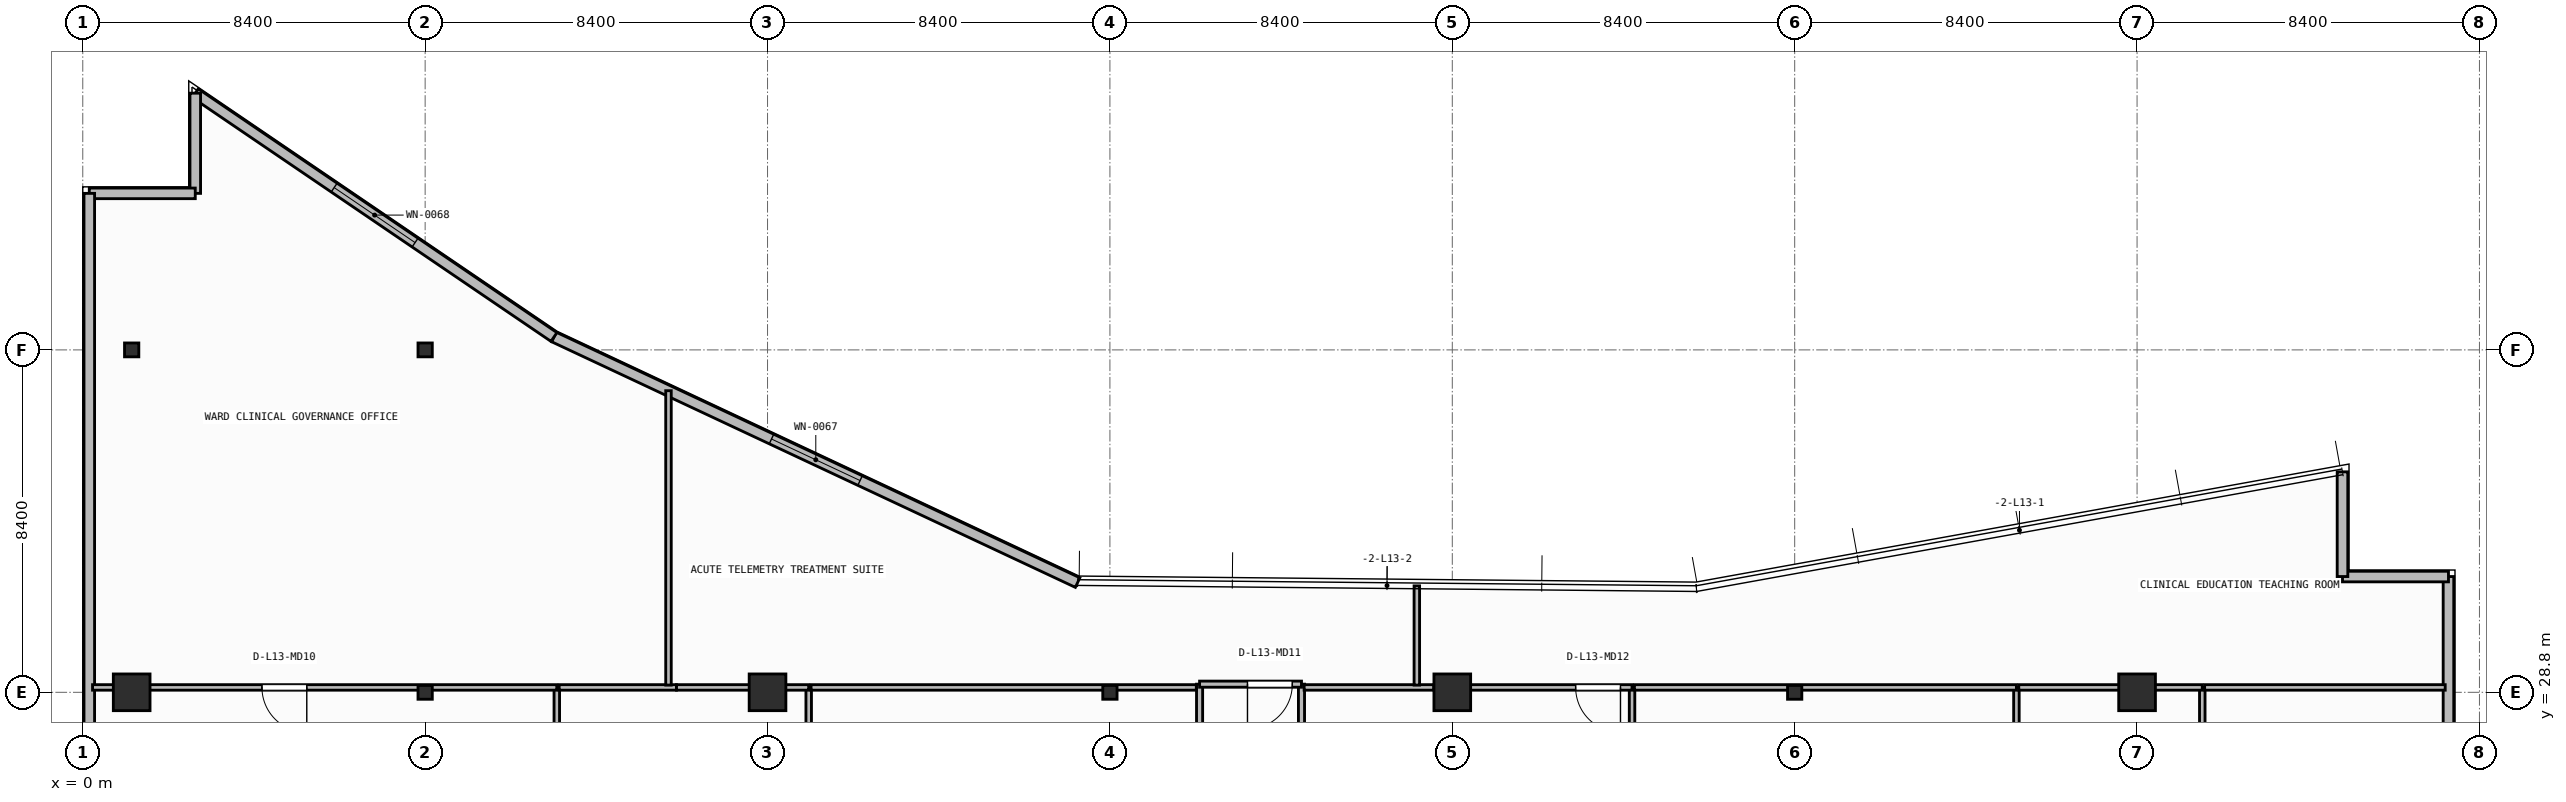
"""IFC4 building model, lengths in metres.
Left out: names, types, materials, properties, quantities, classifications, styles, units other than length and angle.
Written with IfcOpenShell. Run it as: python <this file> out.ifc"""

import sys

from ifc_helpers import new_model, si_unit, direction, frame, frame_2d, origin, origin_2d, place, context, subcontext, project, spatial, rectangle, i_section, extrude, element, fill, save


model = new_model("IFC4")
c1 = context("Model", 3, precision=1e-05, world=origin(), true_north=direction((0.0, 1.0)))
c2 = subcontext(c1, "Body", "Model", "MODEL_VIEW")
j1 = project(units=[si_unit("LENGTHUNIT", "METRE"), si_unit("PLANEANGLEUNIT", "RADIAN")], contexts=[c1])
p1 = place(None, origin())
s1 = spatial("IfcSite", under=j1, at=p1, CompositionType="ELEMENT")
p2 = place(p1, origin())
s2 = spatial("IfcBuilding", under=s1, at=p2, CompositionType="ELEMENT")
p3 = place(p2, frame((0.0, 0.0, 54.1)))
s3 = spatial("IfcBuildingStorey", under=s2, at=p3, CompositionType="ELEMENT", Elevation=54.1)
p4 = place(p3, frame((1.2, 28.8, 0.0), z_axis=(0.0, 0.0, 1.0), x_axis=(1.0, 0.0, 0.0)))
e1 = element("IfcColumn", 1, at=p4, inside=s3, PredefinedType="COLUMN", context=c2, shape_type="SweptSolid", body=[
    extrude(rectangle(XDim=0.9, YDim=0.9, at=origin_2d()), origin(), (0.0, 0.0, 1.0), 3.95),
])
p5 = place(p3, frame((8.4, 28.8, 0.0), z_axis=(0.0, 0.0, 1.0), x_axis=(1.0, 0.0, 0.0)))
e2 = element("IfcColumn", 2, at=p5, inside=s3, PredefinedType="COLUMN", context=c2, shape_type="SweptSolid", body=[
    extrude(i_section(OverallWidth=0.35, OverallDepth=0.34, WebThickness=0.016, FlangeThickness=0.028, at=origin_2d()), origin(), (0.0, 0.0, 1.0), 3.95),
])
p6 = place(p3, frame((16.8, 28.8, 0.0), z_axis=(0.0, 0.0, 1.0), x_axis=(1.0, 0.0, 0.0)))
e3 = element("IfcColumn", 3, at=p6, inside=s3, PredefinedType="COLUMN", context=c2, shape_type="SweptSolid", body=[
    extrude(rectangle(XDim=0.9, YDim=0.9, at=origin_2d()), origin(), (0.0, 0.0, 1.0), 3.95),
])
p7 = place(p3, frame((25.2, 28.8, 0.0), z_axis=(0.0, 0.0, 1.0), x_axis=(1.0, 0.0, 0.0)))
e4 = element("IfcColumn", 4, at=p7, inside=s3, PredefinedType="COLUMN", context=c2, shape_type="SweptSolid", body=[
    extrude(i_section(OverallWidth=0.35, OverallDepth=0.34, WebThickness=0.016, FlangeThickness=0.028, at=origin_2d()), origin(), (0.0, 0.0, 1.0), 3.95),
])
p8 = place(p3, frame((33.6, 28.8, 0.0), z_axis=(0.0, 0.0, 1.0), x_axis=(1.0, 0.0, 0.0)))
e5 = element("IfcColumn", 5, at=p8, inside=s3, PredefinedType="COLUMN", context=c2, shape_type="SweptSolid", body=[
    extrude(rectangle(XDim=0.9, YDim=0.9, at=origin_2d()), origin(), (0.0, 0.0, 1.0), 3.95),
])
p9 = place(p3, frame((42.0, 28.8, 0.0), z_axis=(0.0, 0.0, 1.0), x_axis=(1.0, 0.0, 0.0)))
e6 = element("IfcColumn", 6, at=p9, inside=s3, PredefinedType="COLUMN", context=c2, shape_type="SweptSolid", body=[
    extrude(i_section(OverallWidth=0.35, OverallDepth=0.34, WebThickness=0.016, FlangeThickness=0.028, at=origin_2d()), origin(), (0.0, 0.0, 1.0), 3.95),
])
p10 = place(p3, frame((50.4, 28.8, 0.0), z_axis=(0.0, 0.0, 1.0), x_axis=(1.0, 0.0, 0.0)))
e7 = element("IfcColumn", 7, at=p10, inside=s3, PredefinedType="COLUMN", context=c2, shape_type="SweptSolid", body=[
    extrude(rectangle(XDim=0.9, YDim=0.9, at=origin_2d()), origin(), (0.0, 0.0, 1.0), 3.95),
])
for number, where, z_axis, x_axis in (
    (8, (1.2, 37.2, 0.0), (0.0, 0.0, 1.0), (1.0, 0.0, 0.0)),
    (9, (8.4, 37.2, 0.0), (0.0, 0.0, 1.0), (1.0, 0.0, 0.0)),
):
    element("IfcColumn", number, at=place(p3, frame(where, z_axis=z_axis, x_axis=x_axis)), inside=s3, PredefinedType="COLUMN", context=c2, shape_type="SweptSolid", body=[
        extrude(i_section(OverallWidth=0.35, OverallDepth=0.34, WebThickness=0.016, FlangeThickness=0.028, at=origin_2d()), origin(), (0.0, 0.0, 1.0), 3.95),
    ])
p11 = place(p3, frame((58.04, 7.16, 0.0), z_axis=(0.0, 0.0, 1.0), x_axis=(0.0, 1.0, 0.0)))
e10 = element("IfcWall", 10, at=p11, inside=s3, PredefinedType="STANDARD", context=c2, shape_type="SweptSolid", body=[
    extrude(rectangle(XDim=24.48, YDim=0.26, at=frame_2d((12.24, 0.0))), origin(), (0.0, 0.0, 1.0), 3.71),
])
p12 = place(p11, frame((13.44, 0.0, 0.0)))
e11 = element("IfcOpeningElement", 11, at=p12, cuts=e10, PredefinedType="OPENING", context=c2, shape_type="SweptSolid", body=[
    extrude(rectangle(XDim=1.3, YDim=2.15, at=frame_2d((0.65, 1.075))), frame((0.0, 0.14, 0.0), z_axis=(0.0, -1.0, 0.0), x_axis=(1.0, 0.0, 0.0)), (0.0, 0.0, 1.0), 0.28),
])
p13 = place(p11, frame((8.65, 0.0, 0.9)))
e12 = element("IfcOpeningElement", 12, at=p13, cuts=e10, PredefinedType="OPENING", context=c2, shape_type="SweptSolid", body=[
    extrude(rectangle(XDim=2.4, YDim=1.65, at=frame_2d((1.2, 0.825))), frame((0.0, 0.14, 0.0), z_axis=(0.0, -1.0, 0.0), x_axis=(1.0, 0.0, 0.0)), (0.0, 0.0, 1.0), 0.28),
])
p14 = place(p3, frame((58.04, 31.64, 0.0), z_axis=(0.0, 0.0, 1.0), x_axis=(-1.0, 0.0, 0.0)))
e13 = element("IfcWall", 13, at=p14, inside=s3, PredefinedType="STANDARD", context=c2, shape_type="SweptSolid", body=[
    extrude(rectangle(XDim=2.6, YDim=0.26, at=frame_2d((1.3, 0.0))), origin(), (0.0, 0.0, 1.0), 3.71),
])
p15 = place(p3, frame((55.44, 31.64, 0.0), z_axis=(0.0, 0.0, 1.0), x_axis=(0.0, 1.0, 0.0)))
e14 = element("IfcWall", 14, at=p15, inside=s3, PredefinedType="STANDARD", context=c2, shape_type="SweptSolid", body=[
    extrude(rectangle(XDim=2.569, YDim=0.26, at=frame_2d((1.284, 0.0))), origin(), (0.0, 0.0, 1.0), 3.71),
])
p16 = place(p3, frame((24.408, 31.492, 0.0), z_axis=(0.0, 0.0, 1.0), x_axis=(-0.905396522918, 0.424566998585, 0.0)))
e15 = element("IfcWall", 15, at=p16, inside=s3, PredefinedType="STANDARD", context=c2, shape_type="SweptSolid", body=[
    extrude(rectangle(XDim=14.189, YDim=0.26, at=frame_2d((7.095, 0.0))), origin(), (0.0, 0.0, 1.0), 3.71),
])
p17 = place(p16, frame((5.895, 0.0, 0.9)))
e16 = element("IfcOpeningElement", 16, at=p17, cuts=e15, PredefinedType="OPENING", context=c2, shape_type="SweptSolid", body=[
    extrude(rectangle(XDim=2.4, YDim=1.65, at=frame_2d((1.2, 0.825))), frame((0.0, 0.14, 0.0), z_axis=(0.0, -1.0, 0.0), x_axis=(1.0, 0.0, 0.0)), (0.0, 0.0, 1.0), 0.28),
])
p18 = place(p3, frame((11.561, 37.517, 0.0), z_axis=(0.0, 0.0, 1.0), x_axis=(-0.827064743936, 0.562106670782, 0.0)))
e17 = element("IfcWall", 17, at=p18, inside=s3, PredefinedType="STANDARD", context=c2, shape_type="SweptSolid", body=[
    extrude(rectangle(XDim=10.641, YDim=0.26, at=frame_2d((5.32, 0.0))), origin(), (0.0, 0.0, 1.0), 3.71),
])
p19 = place(p18, frame((4.12, 0.0, 0.9)))
e18 = element("IfcOpeningElement", 18, at=p19, cuts=e17, PredefinedType="OPENING", context=c2, shape_type="SweptSolid", body=[
    extrude(rectangle(XDim=2.4, YDim=1.65, at=frame_2d((1.2, 0.825))), frame((0.0, 0.14, 0.0), z_axis=(0.0, -1.0, 0.0), x_axis=(1.0, 0.0, 0.0)), (0.0, 0.0, 1.0), 0.28),
])
p20 = place(p3, frame((2.76, 43.498, 0.0), z_axis=(0.0, 0.0, 1.0), x_axis=(0.0, -1.0, 0.0)))
e19 = element("IfcWall", 19, at=p20, inside=s3, PredefinedType="STANDARD", context=c2, shape_type="SweptSolid", body=[
    extrude(rectangle(XDim=2.458, YDim=0.26, at=frame_2d((1.229, 0.0))), origin(), (0.0, 0.0, 1.0), 3.71),
])
p21 = place(p3, frame((2.76, 41.04, 0.0), z_axis=(0.0, 0.0, 1.0), x_axis=(-1.0, 0.0, 0.0)))
e20 = element("IfcWall", 20, at=p21, inside=s3, PredefinedType="STANDARD", context=c2, shape_type="SweptSolid", body=[
    extrude(rectangle(XDim=2.6, YDim=0.26, at=frame_2d((1.3, 0.0))), origin(), (0.0, 0.0, 1.0), 3.71),
])
p22 = place(p3, frame((0.16, 41.04, 0.0), z_axis=(0.0, 0.0, 1.0), x_axis=(0.0, -1.0, 0.0)))
e21 = element("IfcWall", 21, at=p22, inside=s3, PredefinedType="STANDARD", context=c2, shape_type="SweptSolid", body=[
    extrude(rectangle(XDim=38.28, YDim=0.26, at=frame_2d((19.14, 0.0))), origin(), (0.0, 0.0, 1.0), 3.71),
])
p23 = place(p22, frame((17.94, 0.0, 0.9)))
e22 = element("IfcOpeningElement", 22, at=p23, cuts=e21, PredefinedType="OPENING", context=c2, shape_type="SweptSolid", body=[
    extrude(rectangle(XDim=2.4, YDim=1.65, at=frame_2d((1.2, 0.825))), frame((0.0, 0.14, 0.0), z_axis=(0.0, -1.0, 0.0), x_axis=(1.0, 0.0, 0.0)), (0.0, 0.0, 1.0), 0.28),
])
p24 = place(p22, frame((22.869, 0.0, 0.9)))
e23 = element("IfcOpeningElement", 23, at=p24, cuts=e21, PredefinedType="OPENING", context=c2, shape_type="SweptSolid", body=[
    extrude(rectangle(XDim=2.4, YDim=1.65, at=frame_2d((1.2, 0.825))), frame((0.0, 0.14, 0.0), z_axis=(0.0, -1.0, 0.0), x_axis=(1.0, 0.0, 0.0)), (0.0, 0.0, 1.0), 0.28),
])
p25 = place(p3, frame((27.4, 29.0, 0.0), z_axis=(0.0, 0.0, 1.0), x_axis=(0.0, -1.0, 0.0)))
e24 = element("IfcWall", 24, at=p25, inside=s3, PredefinedType="PARTITIONING", context=c2, shape_type="SweptSolid", body=[
    extrude(rectangle(XDim=9.432, YDim=0.15, at=frame_2d((4.716, 0.0))), origin(), (0.0, 0.0, 1.0), 3.71),
])
p26 = place(p25, frame((3.769, 0.0, 0.0)))
e25 = element("IfcOpeningElement", 25, at=p26, cuts=e24, PredefinedType="OPENING", context=c2, shape_type="SweptSolid", body=[
    extrude(rectangle(XDim=1.1, YDim=2.1, at=frame_2d((0.55, 1.05))), frame((0.0, 0.085, 0.0), z_axis=(0.0, -1.0, 0.0), x_axis=(1.0, 0.0, 0.0)), (0.0, 0.0, 1.0), 0.17),
])
p27 = place(p3, frame((29.9, 19.568, 0.0), z_axis=(0.0, 0.0, 1.0), x_axis=(0.0, 1.0, 0.0)))
e26 = element("IfcWall", 26, at=p27, inside=s3, PredefinedType="PARTITIONING", context=c2, shape_type="SweptSolid", body=[
    extrude(rectangle(XDim=9.432, YDim=0.15, at=frame_2d((4.716, 0.0))), origin(), (0.0, 0.0, 1.0), 3.71),
])
p28 = place(p27, frame((4.166, 0.0, 0.0)))
e27 = element("IfcOpeningElement", 27, at=p28, cuts=e26, PredefinedType="OPENING", context=c2, shape_type="SweptSolid", body=[
    extrude(rectangle(XDim=1.1, YDim=2.1, at=frame_2d((0.55, 1.05))), frame((0.0, 0.085, 0.0), z_axis=(0.0, -1.0, 0.0), x_axis=(1.0, 0.0, 0.0)), (0.0, 0.0, 1.0), 0.17),
])
p29 = place(p3, frame((29.9, 29.0, 0.0), z_axis=(0.0, 0.0, 1.0), x_axis=(-1.0, 0.0, 0.0)))
e28 = element("IfcWall", 28, at=p29, inside=s3, PredefinedType="PARTITIONING", context=c2, shape_type="SweptSolid", body=[
    extrude(rectangle(XDim=2.5, YDim=0.15, at=frame_2d((1.25, 0.0))), origin(), (0.0, 0.0, 1.0), 3.326),
])
p30 = place(p29, frame((0.225, 0.0, 0.0)))
e29 = element("IfcOpeningElement", 29, at=p30, cuts=e28, PredefinedType="OPENING", context=c2, shape_type="SweptSolid", body=[
    extrude(rectangle(XDim=1.1, YDim=2.1, at=frame_2d((0.55, 1.05))), frame((0.0, 0.085, 0.0), z_axis=(0.0, -1.0, 0.0), x_axis=(1.0, 0.0, 0.0)), (0.0, 0.0, 1.0), 0.17),
])
p31 = place(p3, frame((11.63, 19.397, 0.0), z_axis=(0.0, 0.0, 1.0), x_axis=(0.0, 1.0, 0.0)))
e30 = element("IfcWall", 30, at=p31, inside=s3, PredefinedType="PARTITIONING", context=c2, shape_type="SweptSolid", body=[
    extrude(rectangle(XDim=9.522, YDim=0.135, at=frame_2d((4.761, 0.0))), origin(), (0.0, 0.0, 1.0), 3.71),
])
p32 = place(p3, frame((11.63, 28.92, 0.0), z_axis=(0.0, 0.0, 1.0), x_axis=(-1.0, 0.0, 0.0)))
e31 = element("IfcWall", 31, at=p32, inside=s3, PredefinedType="PARTITIONING", context=c2, shape_type="SweptSolid", body=[
    extrude(rectangle(XDim=11.39, YDim=0.135, at=frame_2d((5.695, 0.0))), origin(), (0.0, 0.0, 1.0), 3.073),
])
p33 = place(p32, frame((6.134, 0.0, 0.0)))
e32 = element("IfcOpeningElement", 32, at=p33, cuts=e31, PredefinedType="OPENING", context=c2, shape_type="SweptSolid", body=[
    extrude(rectangle(XDim=1.1, YDim=2.1, at=frame_2d((0.55, 1.05))), frame((0.0, 0.077, 0.0), z_axis=(0.0, -1.0, 0.0), x_axis=(1.0, 0.0, 0.0)), (0.0, 0.0, 1.0), 0.155),
])
p34 = place(p3, frame((17.81, 19.397, 0.0), z_axis=(0.0, 0.0, 1.0), x_axis=(0.0, 1.0, 0.0)))
e33 = element("IfcWall", 33, at=p34, inside=s3, PredefinedType="PARTITIONING", context=c2, shape_type="SweptSolid", body=[
    extrude(rectangle(XDim=9.522, YDim=0.135, at=frame_2d((4.761, 0.0))), origin(), (0.0, 0.0, 1.0), 3.71),
])
p35 = place(p3, frame((14.565, 28.92, 0.0), z_axis=(0.0, 0.0, 1.0), x_axis=(-1.0, 0.0, 0.0)))
e34 = element("IfcWall", 34, at=p35, inside=s3, PredefinedType="PARTITIONING", context=c2, shape_type="SweptSolid", body=[
    extrude(rectangle(XDim=2.877, YDim=0.135, at=frame_2d((1.438, 0.0))), origin(), (0.0, 0.0, 1.0), 3.073),
])
p36 = place(p3, frame((17.81, 28.92, 0.0), z_axis=(0.0, 0.0, 1.0), x_axis=(-1.0, 0.0, 0.0)))
e35 = element("IfcWall", 35, at=p36, inside=s3, PredefinedType="PARTITIONING", context=c2, shape_type="SweptSolid", body=[
    extrude(rectangle(XDim=3.243, YDim=0.135, at=frame_2d((1.622, 0.0))), origin(), (0.0, 0.0, 1.0), 3.073),
])
p37 = place(p3, frame((27.32, 28.92, 0.0), z_axis=(0.0, 0.0, 1.0), x_axis=(-1.0, 0.0, 0.0)))
e36 = element("IfcWall", 36, at=p37, inside=s3, PredefinedType="PARTITIONING", context=c2, shape_type="SweptSolid", body=[
    extrude(rectangle(XDim=9.453, YDim=0.135, at=frame_2d((4.726, 0.0))), origin(), (0.0, 0.0, 1.0), 3.073),
])
p38 = place(p3, frame((38.01, 19.397, 0.0), z_axis=(0.0, 0.0, 1.0), x_axis=(0.0, 1.0, 0.0)))
e37 = element("IfcWall", 37, at=p38, inside=s3, PredefinedType="PARTITIONING", context=c2, shape_type="SweptSolid", body=[
    extrude(rectangle(XDim=9.522, YDim=0.135, at=frame_2d((4.761, 0.0))), origin(), (0.0, 0.0, 1.0), 3.71),
])
p39 = place(p38, frame((4.211, 0.0, 0.0)))
e38 = element("IfcOpeningElement", 38, at=p39, cuts=e37, PredefinedType="OPENING", context=c2, shape_type="SweptSolid", body=[
    extrude(rectangle(XDim=1.1, YDim=2.1, at=frame_2d((0.55, 1.05))), frame((0.0, 0.077, 0.0), z_axis=(0.0, -1.0, 0.0), x_axis=(1.0, 0.0, 0.0)), (0.0, 0.0, 1.0), 0.155),
])
p40 = place(p3, frame((33.15, 28.92, 0.0), z_axis=(0.0, 0.0, 1.0), x_axis=(-1.0, 0.0, 0.0)))
e39 = element("IfcWall", 39, at=p40, inside=s3, PredefinedType="PARTITIONING", context=c2, shape_type="SweptSolid", body=[
    extrude(rectangle(XDim=3.185, YDim=0.135, at=frame_2d((1.592, 0.0))), origin(), (0.0, 0.0, 1.0), 3.326),
])
p41 = place(p3, frame((38.01, 28.92, 0.0), z_axis=(0.0, 0.0, 1.0), x_axis=(-1.0, 0.0, 0.0)))
e40 = element("IfcWall", 40, at=p41, inside=s3, PredefinedType="PARTITIONING", context=c2, shape_type="SweptSolid", body=[
    extrude(rectangle(XDim=4.858, YDim=0.135, at=frame_2d((2.429, 0.0))), origin(), (0.0, 0.0, 1.0), 3.326),
])
p42 = place(p41, frame((0.284, 0.0, 0.0)))
e41 = element("IfcOpeningElement", 41, at=p42, cuts=e40, PredefinedType="OPENING", context=c2, shape_type="SweptSolid", body=[
    extrude(rectangle(XDim=1.1, YDim=2.1, at=frame_2d((0.55, 1.05))), frame((0.0, 0.077, 0.0), z_axis=(0.0, -1.0, 0.0), x_axis=(1.0, 0.0, 0.0)), (0.0, 0.0, 1.0), 0.155),
])
p43 = place(p3, frame((47.44, 19.397, 0.0), z_axis=(0.0, 0.0, 1.0), x_axis=(0.0, 1.0, 0.0)))
e42 = element("IfcWall", 42, at=p43, inside=s3, PredefinedType="PARTITIONING", context=c2, shape_type="SweptSolid", body=[
    extrude(rectangle(XDim=9.522, YDim=0.135, at=frame_2d((4.761, 0.0))), origin(), (0.0, 0.0, 1.0), 3.71),
])
p44 = place(p43, frame((4.211, 0.0, 0.0)))
e43 = element("IfcOpeningElement", 43, at=p44, cuts=e42, PredefinedType="OPENING", context=c2, shape_type="SweptSolid", body=[
    extrude(rectangle(XDim=1.1, YDim=2.1, at=frame_2d((0.55, 1.05))), frame((0.0, 0.077, 0.0), z_axis=(0.0, -1.0, 0.0), x_axis=(1.0, 0.0, 0.0)), (0.0, 0.0, 1.0), 0.155),
])
p45 = place(p3, frame((47.44, 28.92, 0.0), z_axis=(0.0, 0.0, 1.0), x_axis=(-1.0, 0.0, 0.0)))
e44 = element("IfcWall", 44, at=p45, inside=s3, PredefinedType="PARTITIONING", context=c2, shape_type="SweptSolid", body=[
    extrude(rectangle(XDim=9.373, YDim=0.135, at=frame_2d((4.686, 0.0))), origin(), (0.0, 0.0, 1.0), 3.073),
])
p46 = place(p3, frame((52.0, 19.397, 0.0), z_axis=(0.0, 0.0, 1.0), x_axis=(0.0, 1.0, 0.0)))
e45 = element("IfcWall", 45, at=p46, inside=s3, PredefinedType="PARTITIONING", context=c2, shape_type="SweptSolid", body=[
    extrude(rectangle(XDim=9.522, YDim=0.135, at=frame_2d((4.761, 0.0))), origin(), (0.0, 0.0, 1.0), 3.71),
])
p47 = place(p46, frame((4.612, 0.0, 0.0)))
e46 = element("IfcOpeningElement", 46, at=p47, cuts=e45, PredefinedType="OPENING", context=c2, shape_type="SweptSolid", body=[
    extrude(rectangle(XDim=1.1, YDim=2.1, at=frame_2d((0.55, 1.05))), frame((0.0, 0.077, 0.0), z_axis=(0.0, -1.0, 0.0), x_axis=(1.0, 0.0, 0.0)), (0.0, 0.0, 1.0), 0.155),
])
p48 = place(p3, frame((52.0, 28.92, 0.0), z_axis=(0.0, 0.0, 1.0), x_axis=(-1.0, 0.0, 0.0)))
e47 = element("IfcWall", 47, at=p48, inside=s3, PredefinedType="PARTITIONING", context=c2, shape_type="SweptSolid", body=[
    extrude(rectangle(XDim=4.502, YDim=0.135, at=frame_2d((2.251, 0.0))), origin(), (0.0, 0.0, 1.0), 3.073),
])
p49 = place(p3, frame((57.96, 28.92, 0.0), z_axis=(0.0, 0.0, 1.0), x_axis=(-1.0, 0.0, 0.0)))
e48 = element("IfcWall", 48, at=p49, inside=s3, PredefinedType="PARTITIONING", context=c2, shape_type="SweptSolid", body=[
    extrude(rectangle(XDim=5.902, YDim=0.135, at=frame_2d((2.951, 0.0))), origin(), (0.0, 0.0, 1.0), 3.71),
])
p50 = place(p3, frame((14.37, 28.978, 0.0), z_axis=(0.0, 0.0, 1.0), x_axis=(0.0, 1.0, 0.0)))
e49 = element("IfcWall", 49, at=p50, inside=s3, PredefinedType="PARTITIONING", context=c2, shape_type="SweptSolid", body=[
    extrude(rectangle(XDim=7.222, YDim=0.135, at=frame_2d((3.611, 0.0))), origin(), (0.0, 0.0, 1.0), 3.71),
])
p51 = place(p3, frame((32.73, 28.978, 0.0), z_axis=(0.0, 0.0, 1.0), x_axis=(0.0, 1.0, 0.0)))
e50 = element("IfcWall", 50, at=p51, inside=s3, PredefinedType="PARTITIONING", context=c2, shape_type="SweptSolid", body=[
    extrude(rectangle(XDim=2.433, YDim=0.135, at=frame_2d((1.217, 0.0))), origin(), (0.0, 0.0, 1.0), 3.71),
])
p52 = place(p17, origin())
e51 = element("IfcWindow", 51, at=p52, inside=s3, PartitioningType="SINGLE_PANEL", PredefinedType="WINDOW", context=c2, shape_type="SweptSolid", body=[
    extrude(rectangle(XDim=2.4, YDim=1.65, at=frame_2d((1.2, 0.825))), frame((0.0, 0.03, 0.0), z_axis=(0.0, -1.0, 0.0), x_axis=(1.0, 0.0, 0.0)), (0.0, 0.0, 1.0), 0.06),
])
fill(e16, e51)
p53 = place(p19, origin())
e52 = element("IfcWindow", 52, at=p53, inside=s3, PartitioningType="SINGLE_PANEL", PredefinedType="WINDOW", context=c2, shape_type="SweptSolid", body=[
    extrude(rectangle(XDim=2.4, YDim=1.65, at=frame_2d((1.2, 0.825))), frame((0.0, 0.03, 0.0), z_axis=(0.0, -1.0, 0.0), x_axis=(1.0, 0.0, 0.0)), (0.0, 0.0, 1.0), 0.06),
])
fill(e18, e52)
p54 = place(p30, origin())
e53 = element("IfcDoor", 53, at=p54, inside=s3, OperationType="SINGLE_SWING_RIGHT", PredefinedType="DOOR", context=c2, shape_type="SweptSolid", body=[
    extrude(rectangle(XDim=1.1, YDim=2.1, at=frame_2d((0.55, 1.05))), frame((0.0, 0.025, 0.0), z_axis=(0.0, -1.0, 0.0), x_axis=(1.0, 0.0, 0.0)), (0.0, 0.0, 1.0), 0.05),
])
fill(e29, e53)
p55 = place(p33, origin())
e54 = element("IfcDoor", 54, at=p55, inside=s3, OperationType="SINGLE_SWING_LEFT", PredefinedType="DOOR", context=c2, shape_type="SweptSolid", body=[
    extrude(rectangle(XDim=1.1, YDim=2.1, at=frame_2d((0.55, 1.05))), frame((0.0, 0.025, 0.0), z_axis=(0.0, -1.0, 0.0), x_axis=(1.0, 0.0, 0.0)), (0.0, 0.0, 1.0), 0.05),
])
fill(e32, e54)
p56 = place(p42, origin())
e55 = element("IfcDoor", 55, at=p56, inside=s3, OperationType="SINGLE_SWING_LEFT", PredefinedType="DOOR", context=c2, shape_type="SweptSolid", body=[
    extrude(rectangle(XDim=1.1, YDim=2.1, at=frame_2d((0.55, 1.05))), frame((0.0, 0.025, 0.0), z_axis=(0.0, -1.0, 0.0), x_axis=(1.0, 0.0, 0.0)), (0.0, 0.0, 1.0), 0.05),
])
fill(e41, e55)
save(model, sys.argv[1])
